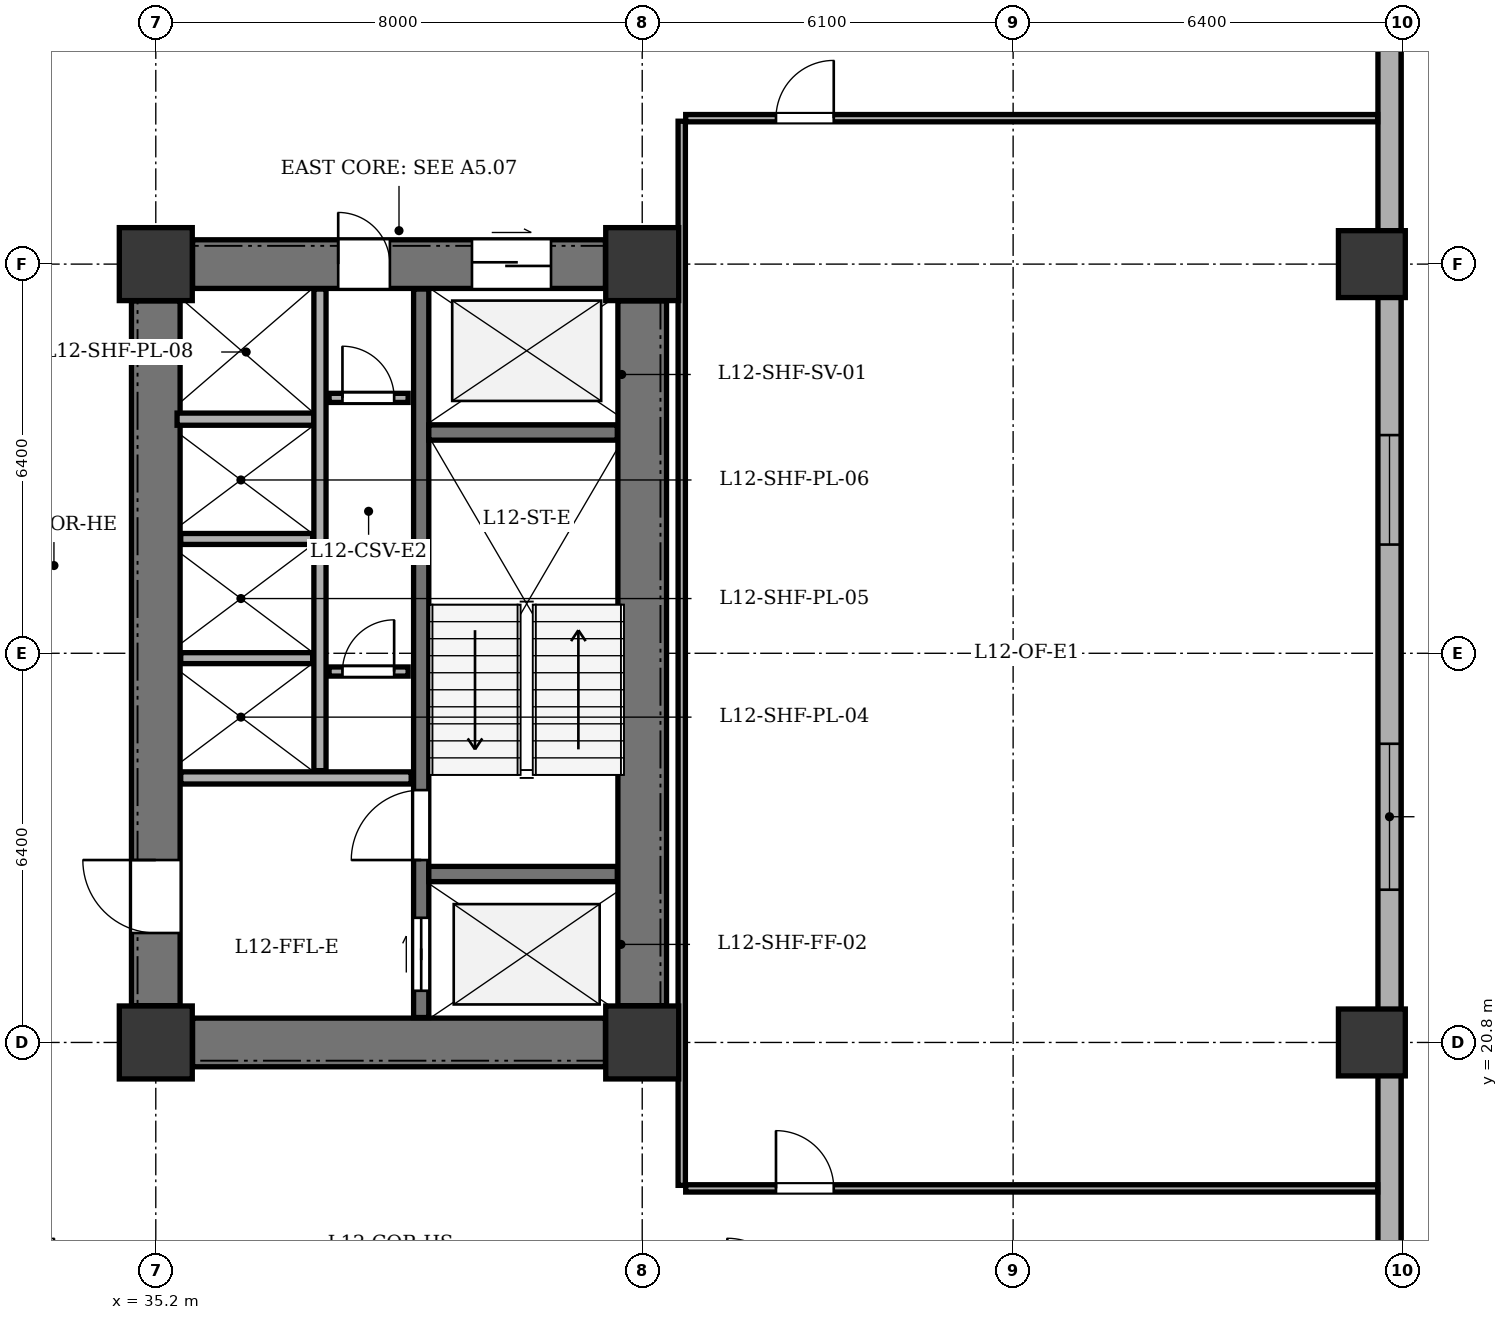
"""IFC4 building model, lengths in metres.
Left out: names, types, materials, properties, quantities, classifications, styles, units other than length and angle.
Written with IfcOpenShell. Run it as: python <this file> out.ifc"""

import sys

from ifc_helpers import new_model, si_unit, direction, frame, frame_2d, origin, origin_2d, place, context, subcontext, project, spatial, rectangle, extrude, element, fill, save


model = new_model("IFC4")
c1 = context("Model", 3, precision=1e-05, world=origin(), true_north=direction((0.0, 1.0)))
c2 = subcontext(c1, "Body", "Model", "MODEL_VIEW")
j1 = project(units=[si_unit("LENGTHUNIT", "METRE"), si_unit("PLANEANGLEUNIT", "RADIAN")], contexts=[c1])
p1 = place(None, origin())
s1 = spatial("IfcSite", under=j1, at=p1, CompositionType="ELEMENT")
p2 = place(p1, origin())
s2 = spatial("IfcBuilding", under=s1, at=p2, CompositionType="ELEMENT")
p3 = place(p2, frame((0.0, 0.0, 51.6)))
s3 = spatial("IfcBuildingStorey", under=s2, at=p3, CompositionType="ELEMENT", Elevation=51.6)
for number, where, z_axis, x_axis in (
    (1, (35.2, 20.8, 0.0), (0.0, 0.0, 1.0), (1.0, 0.0, 0.0)),
    (2, (43.2, 20.8, 0.0), (0.0, 0.0, 1.0), (1.0, 0.0, 0.0)),
    (3, (35.2, 33.6, 0.0), (0.0, 0.0, 1.0), (1.0, 0.0, 0.0)),
    (4, (43.2, 33.6, 0.0), (0.0, 0.0, 1.0), (1.0, 0.0, 0.0)),
):
    element("IfcColumn", number, at=place(p3, frame(where, z_axis=z_axis, x_axis=x_axis)), inside=s3, PredefinedType="COLUMN", context=c2, shape_type="SweptSolid", body=[
        extrude(rectangle(XDim=1.2, YDim=1.2, at=origin_2d()), origin(), (0.0, 0.0, 1.0), 3.9),
    ])
for number, where, z_axis, x_axis in (
    (5, (55.2, 20.8, 0.0), (0.0, 0.0, 1.0), (1.0, 0.0, 0.0)),
    (6, (55.2, 33.6, 0.0), (0.0, 0.0, 1.0), (1.0, 0.0, 0.0)),
):
    element("IfcColumn", number, at=place(p3, frame(where, z_axis=z_axis, x_axis=x_axis)), inside=s3, PredefinedType="COLUMN", context=c2, shape_type="SweptSolid", body=[
        extrude(rectangle(XDim=1.1, YDim=1.1, at=origin_2d()), origin(), (0.0, 0.0, 1.0), 3.9),
    ])
p4 = place(p3, frame((55.49, 41.5, 0.0), z_axis=(0.0, 0.0, 1.0), x_axis=(0.0, -1.0, 0.0)))
e7 = element("IfcWall", 7, at=p4, inside=s3, PredefinedType="STANDARD", context=c2, shape_type="SweptSolid", body=[
    extrude(rectangle(XDim=35.0, YDim=0.38, at=frame_2d((17.5, 0.0))), origin(), (0.0, 0.0, 1.0), 3.135),
])
p5 = place(p4, frame((2.025, 0.0, 0.8)))
e8 = element("IfcOpeningElement", 8, at=p5, cuts=e7, PredefinedType="OPENING", context=c2, shape_type="SweptSolid", body=[
    extrude(rectangle(XDim=1.8, YDim=1.9, at=frame_2d((0.9, 0.95))), frame((0.0, 0.2, 0.0), z_axis=(0.0, -1.0, 0.0), x_axis=(1.0, 0.0, 0.0)), (0.0, 0.0, 1.0), 0.4),
])
p6 = place(p4, frame((10.712, 0.0, 0.8)))
e9 = element("IfcOpeningElement", 9, at=p6, cuts=e7, PredefinedType="OPENING", context=c2, shape_type="SweptSolid", body=[
    extrude(rectangle(XDim=1.8, YDim=1.9, at=frame_2d((0.9, 0.95))), frame((0.0, 0.2, 0.0), z_axis=(0.0, -1.0, 0.0), x_axis=(1.0, 0.0, 0.0)), (0.0, 0.0, 1.0), 0.4),
])
p7 = place(p4, frame((15.788, 0.0, 0.8)))
e10 = element("IfcOpeningElement", 10, at=p7, cuts=e7, PredefinedType="OPENING", context=c2, shape_type="SweptSolid", body=[
    extrude(rectangle(XDim=2.4, YDim=1.9, at=frame_2d((1.2, 0.95))), frame((0.0, 0.2, 0.0), z_axis=(0.0, -1.0, 0.0), x_axis=(1.0, 0.0, 0.0)), (0.0, 0.0, 1.0), 0.4),
])
p8 = place(p4, frame((25.443, 0.0, 0.8)))
e11 = element("IfcOpeningElement", 11, at=p8, cuts=e7, PredefinedType="OPENING", context=c2, shape_type="SweptSolid", body=[
    extrude(rectangle(XDim=1.8, YDim=1.9, at=frame_2d((0.9, 0.95))), frame((0.0, 0.2, 0.0), z_axis=(0.0, -1.0, 0.0), x_axis=(1.0, 0.0, 0.0)), (0.0, 0.0, 1.0), 0.4),
])
p9 = place(p4, frame((30.207, 0.0, 0.8)))
e12 = element("IfcOpeningElement", 12, at=p9, cuts=e7, PredefinedType="OPENING", context=c2, shape_type="SweptSolid", body=[
    extrude(rectangle(XDim=2.4, YDim=1.9, at=frame_2d((1.2, 0.95))), frame((0.0, 0.2, 0.0), z_axis=(0.0, -1.0, 0.0), x_axis=(1.0, 0.0, 0.0)), (0.0, 0.0, 1.0), 0.4),
])
p10 = place(p3, frame((43.2, 21.405, 0.0), z_axis=(0.0, 0.0, 1.0), x_axis=(0.0, 1.0, 0.0)))
e13 = element("IfcWall", 13, at=p10, inside=s3, PredefinedType="SHEAR", context=c2, shape_type="SweptSolid", body=[
    extrude(rectangle(XDim=11.59, YDim=0.8, at=frame_2d((5.795, 0.0))), origin(), (0.0, 0.0, 1.0), 3.6),
])
p11 = place(p3, frame((35.805, 20.8, 0.0), z_axis=(0.0, 0.0, 1.0), x_axis=(1.0, 0.0, 0.0)))
e14 = element("IfcWall", 14, at=p11, inside=s3, PredefinedType="SHEAR", context=c2, shape_type="SweptSolid", body=[
    extrude(rectangle(XDim=6.79, YDim=0.8, at=frame_2d((3.395, 0.0))), origin(), (0.0, 0.0, 1.0), 3.6),
])
p12 = place(p3, frame((35.805, 33.6, 0.0), z_axis=(0.0, 0.0, 1.0), x_axis=(1.0, 0.0, 0.0)))
e15 = element("IfcWall", 15, at=p12, inside=s3, PredefinedType="SHEAR", context=c2, shape_type="SweptSolid", body=[
    extrude(rectangle(XDim=6.79, YDim=0.8, at=frame_2d((3.395, 0.0))), origin(), (0.0, 0.0, 1.0), 3.6),
])
p13 = place(p12, frame((4.595, 0.0, 0.0)))
e16 = element("IfcOpeningElement", 16, at=p13, cuts=e15, PredefinedType="OPENING", context=c2, shape_type="SweptSolid", body=[
    extrude(rectangle(XDim=1.3, YDim=2.15, at=frame_2d((0.65, 1.075))), frame((0.0, 0.41, 0.0), z_axis=(0.0, -1.0, 0.0), x_axis=(1.0, 0.0, 0.0)), (0.0, 0.0, 1.0), 0.82),
])
p14 = place(p12, frame((2.395, 0.0, 0.0)))
e17 = element("IfcOpeningElement", 17, at=p14, cuts=e15, PredefinedType="OPENING", context=c2, shape_type="SweptSolid", body=[
    extrude(rectangle(XDim=0.85, YDim=2.02, at=frame_2d((0.425, 1.01))), frame((0.0, 0.41, 0.0), z_axis=(0.0, -1.0, 0.0), x_axis=(1.0, 0.0, 0.0)), (0.0, 0.0, 1.0), 0.82),
])
p15 = place(p3, frame((35.2, 21.405, 0.0), z_axis=(0.0, 0.0, 1.0), x_axis=(0.0, 1.0, 0.0)))
e18 = element("IfcWall", 18, at=p15, inside=s3, PredefinedType="SHEAR", context=c2, shape_type="SweptSolid", body=[
    extrude(rectangle(XDim=11.59, YDim=0.8, at=frame_2d((5.795, 0.0))), origin(), (0.0, 0.0, 1.0), 3.6),
])
p16 = place(p15, frame((1.195, 0.0, 0.0)))
e19 = element("IfcOpeningElement", 19, at=p16, cuts=e18, PredefinedType="OPENING", context=c2, shape_type="SweptSolid", body=[
    extrude(rectangle(XDim=1.2, YDim=2.15, at=frame_2d((0.6, 1.075))), frame((0.0, 0.41, 0.0), z_axis=(0.0, -1.0, 0.0), x_axis=(1.0, 0.0, 0.0)), (0.0, 0.0, 1.0), 0.82),
])
p17 = place(p3, frame((39.565, 21.21, 0.0), z_axis=(0.0, 0.0, 1.0), x_axis=(0.0, 1.0, 0.0)))
e20 = element("IfcWall", 20, at=p17, inside=s3, PredefinedType="SHEAR", context=c2, shape_type="SweptSolid", body=[
    extrude(rectangle(XDim=11.98, YDim=0.25, at=frame_2d((5.99, 0.0))), origin(), (0.0, 0.0, 1.0), 3.6),
])
p18 = place(p17, frame((0.44, 0.0, 0.0)))
e21 = element("IfcOpeningElement", 21, at=p18, cuts=e20, PredefinedType="OPENING", context=c2, shape_type="SweptSolid", body=[
    extrude(rectangle(XDim=1.2, YDim=2.15, at=frame_2d((0.6, 1.075))), frame((0.0, 0.135, 0.0), z_axis=(0.0, -1.0, 0.0), x_axis=(1.0, 0.0, 0.0)), (0.0, 0.0, 1.0), 0.27),
])
p19 = place(p17, frame((2.59, 0.0, 0.0)))
e22 = element("IfcOpeningElement", 22, at=p19, cuts=e20, PredefinedType="OPENING", context=c2, shape_type="SweptSolid", body=[
    extrude(rectangle(XDim=1.15, YDim=2.15, at=frame_2d((0.575, 1.075))), frame((0.0, 0.135, 0.0), z_axis=(0.0, -1.0, 0.0), x_axis=(1.0, 0.0, 0.0)), (0.0, 0.0, 1.0), 0.27),
])
for number, where, z_axis, x_axis in (
    (23, (39.69, 23.57, 0.0), (0.0, 0.0, 1.0), (1.0, 0.0, 0.0)),
    (24, (39.69, 30.83, 0.0), (0.0, 0.0, 1.0), (1.0, 0.0, 0.0)),
):
    element("IfcWall", number, at=place(p3, frame(where, z_axis=z_axis, x_axis=x_axis)), inside=s3, PredefinedType="SHEAR", context=c2, shape_type="SweptSolid", body=[
        extrude(rectangle(XDim=3.1, YDim=0.25, at=frame_2d((1.55, 0.0))), origin(), (0.0, 0.0, 1.0), 3.6),
    ])
p20 = place(p3, frame((35.61, 25.15, 0.0), z_axis=(0.0, 0.0, 1.0), x_axis=(1.0, 0.0, 0.0)))
e25 = element("IfcWall", 25, at=p20, inside=s3, PredefinedType="SOLIDWALL", context=c2, shape_type="SweptSolid", body=[
    extrude(rectangle(XDim=3.79, YDim=0.2, at=frame_2d((1.895, 0.0))), origin(), (0.0, 0.0, 1.0), 3.6),
])
p21 = place(p3, frame((35.55, 31.05, 0.0), z_axis=(0.0, 0.0, 1.0), x_axis=(1.0, 0.0, 0.0)))
e26 = element("IfcWall", 26, at=p21, inside=s3, PredefinedType="SOLIDWALL", context=c2, shape_type="SweptSolid", body=[
    extrude(rectangle(XDim=2.25, YDim=0.2, at=frame_2d((1.125, 0.0))), origin(), (0.0, 0.0, 1.0), 3.6),
])
p22 = place(p3, frame((37.9, 25.27, 0.0), z_axis=(0.0, 0.0, 1.0), x_axis=(0.0, 1.0, 0.0)))
e27 = element("IfcWall", 27, at=p22, inside=s3, PredefinedType="SOLIDWALL", context=c2, shape_type="SweptSolid", body=[
    extrude(rectangle(XDim=7.92, YDim=0.2, at=frame_2d((3.96, 0.0))), origin(), (0.0, 0.0, 1.0), 3.6),
])
for number, where, z_axis, x_axis in (
    (28, (35.61, 27.12, 0.0), (0.0, 0.0, 1.0), (1.0, 0.0, 0.0)),
    (29, (35.61, 29.08, 0.0), (0.0, 0.0, 1.0), (1.0, 0.0, 0.0)),
):
    element("IfcWall", number, at=place(p3, frame(where, z_axis=z_axis, x_axis=x_axis)), inside=s3, PredefinedType="PARTITIONING", context=c2, shape_type="SweptSolid", body=[
        extrude(rectangle(XDim=2.17, YDim=0.18, at=frame_2d((1.085, 0.0))), origin(), (0.0, 0.0, 1.0), 3.6),
    ])
p23 = place(p3, frame((38.05, 26.9, 0.0), z_axis=(0.0, 0.0, 1.0), x_axis=(1.0, 0.0, 0.0)))
e30 = element("IfcWall", 30, at=p23, inside=s3, PredefinedType="PARTITIONING", context=c2, shape_type="SweptSolid", body=[
    extrude(rectangle(XDim=1.3, YDim=0.15, at=frame_2d((0.65, 0.0))), origin(), (0.0, 0.0, 1.0), 3.6),
])
p24 = place(p23, frame((0.22, 0.0, 0.0)))
e31 = element("IfcOpeningElement", 31, at=p24, cuts=e30, PredefinedType="OPENING", context=c2, shape_type="SweptSolid", body=[
    extrude(rectangle(XDim=0.85, YDim=2.02, at=frame_2d((0.425, 1.01))), frame((0.0, 0.085, 0.0), z_axis=(0.0, -1.0, 0.0), x_axis=(1.0, 0.0, 0.0)), (0.0, 0.0, 1.0), 0.17),
])
p25 = place(p3, frame((38.05, 31.4, 0.0), z_axis=(0.0, 0.0, 1.0), x_axis=(1.0, 0.0, 0.0)))
e32 = element("IfcWall", 32, at=p25, inside=s3, PredefinedType="PARTITIONING", context=c2, shape_type="SweptSolid", body=[
    extrude(rectangle(XDim=1.3, YDim=0.15, at=frame_2d((0.65, 0.0))), origin(), (0.0, 0.0, 1.0), 3.6),
])
p26 = place(p25, frame((0.22, 0.0, 0.0)))
e33 = element("IfcOpeningElement", 33, at=p26, cuts=e32, PredefinedType="OPENING", context=c2, shape_type="SweptSolid", body=[
    extrude(rectangle(XDim=0.85, YDim=2.02, at=frame_2d((0.425, 1.01))), frame((0.0, 0.085, 0.0), z_axis=(0.0, -1.0, 0.0), x_axis=(1.0, 0.0, 0.0)), (0.0, 0.0, 1.0), 0.17),
])
p27 = place(p3, frame((43.85, 18.45, 0.0), z_axis=(0.0, 0.0, 1.0), x_axis=(0.0, 1.0, 0.0)))
e34 = element("IfcWall", 34, at=p27, inside=s3, PredefinedType="PARTITIONING", context=c2, shape_type="SweptSolid", body=[
    extrude(rectangle(XDim=17.5, YDim=0.12, at=frame_2d((8.75, 0.0))), origin(), (0.0, 0.0, 1.0), 3.6),
])
p28 = place(p3, frame((43.915, 18.4, 0.0), z_axis=(0.0, 0.0, 1.0), x_axis=(1.0, 0.0, 0.0)))
e35 = element("IfcWall", 35, at=p28, inside=s3, PredefinedType="PARTITIONING", context=c2, shape_type="SweptSolid", body=[
    extrude(rectangle(XDim=11.38, YDim=0.12, at=frame_2d((5.69, 0.0))), origin(), (0.0, 0.0, 1.0), 3.6),
])
p29 = place(p28, frame((1.485, 0.0, 0.0)))
e36 = element("IfcOpeningElement", 36, at=p29, cuts=e35, PredefinedType="OPENING", context=c2, shape_type="SweptSolid", body=[
    extrude(rectangle(XDim=0.95, YDim=2.1, at=frame_2d((0.475, 1.05))), frame((0.0, 0.07, 0.0), z_axis=(0.0, -1.0, 0.0), x_axis=(1.0, 0.0, 0.0)), (0.0, 0.0, 1.0), 0.14),
])
p30 = place(p3, frame((43.915, 36.0, 0.0), z_axis=(0.0, 0.0, 1.0), x_axis=(1.0, 0.0, 0.0)))
e37 = element("IfcWall", 37, at=p30, inside=s3, PredefinedType="PARTITIONING", context=c2, shape_type="SweptSolid", body=[
    extrude(rectangle(XDim=11.38, YDim=0.12, at=frame_2d((5.69, 0.0))), origin(), (0.0, 0.0, 1.0), 3.6),
])
p31 = place(p30, frame((1.485, 0.0, 0.0)))
e38 = element("IfcOpeningElement", 38, at=p31, cuts=e37, PredefinedType="OPENING", context=c2, shape_type="SweptSolid", body=[
    extrude(rectangle(XDim=0.95, YDim=2.1, at=frame_2d((0.475, 1.05))), frame((0.0, 0.07, 0.0), z_axis=(0.0, -1.0, 0.0), x_axis=(1.0, 0.0, 0.0)), (0.0, 0.0, 1.0), 0.14),
])
p32 = place(p6, origin())
e39 = element("IfcWindow", 39, at=p32, inside=s3, PartitioningType="SINGLE_PANEL", PredefinedType="WINDOW", context=c2, shape_type="SweptSolid", body=[
    extrude(rectangle(XDim=1.8, YDim=1.9, at=frame_2d((0.9, 0.95))), frame((0.0, -0.01, 0.0), z_axis=(0.0, -1.0, 0.0), x_axis=(1.0, 0.0, 0.0)), (0.0, 0.0, 1.0), 0.06),
])
fill(e9, e39)
p33 = place(p7, origin())
e40 = element("IfcWindow", 40, at=p33, inside=s3, PartitioningType="SINGLE_PANEL", PredefinedType="WINDOW", context=c2, shape_type="SweptSolid", body=[
    extrude(rectangle(XDim=2.4, YDim=1.9, at=frame_2d((1.2, 0.95))), frame((0.0, -0.01, 0.0), z_axis=(0.0, -1.0, 0.0), x_axis=(1.0, 0.0, 0.0)), (0.0, 0.0, 1.0), 0.06),
])
fill(e10, e40)
p34 = place(p13, origin())
e41 = element("IfcDoor", 41, at=p34, inside=s3, OperationType="DOUBLE_DOOR_SLIDING", PredefinedType="DOOR", context=c2, shape_type="SweptSolid", body=[
    extrude(rectangle(XDim=1.3, YDim=2.15, at=frame_2d((0.65, 1.075))), frame((0.0, 0.025, 0.0), z_axis=(0.0, -1.0, 0.0), x_axis=(1.0, 0.0, 0.0)), (0.0, 0.0, 1.0), 0.05),
])
fill(e16, e41)
p35 = place(p14, origin())
e42 = element("IfcDoor", 42, at=p35, inside=s3, OperationType="SINGLE_SWING_LEFT", PredefinedType="DOOR", context=c2, shape_type="SweptSolid", body=[
    extrude(rectangle(XDim=0.85, YDim=2.02, at=frame_2d((0.425, 1.01))), frame((0.0, 0.025, 0.0), z_axis=(0.0, -1.0, 0.0), x_axis=(1.0, 0.0, 0.0)), (0.0, 0.0, 1.0), 0.05),
])
fill(e17, e42)
p36 = place(p16, origin())
e43 = element("IfcDoor", 43, at=p36, inside=s3, OperationType="SINGLE_SWING_RIGHT", PredefinedType="DOOR", context=c2, shape_type="SweptSolid", body=[
    extrude(rectangle(XDim=1.2, YDim=2.15, at=frame_2d((0.6, 1.075))), frame((0.0, 0.025, 0.0), z_axis=(0.0, -1.0, 0.0), x_axis=(1.0, 0.0, 0.0)), (0.0, 0.0, 1.0), 0.05),
])
fill(e19, e43)
p37 = place(p18, origin())
e44 = element("IfcDoor", 44, at=p37, inside=s3, OperationType="DOUBLE_DOOR_SLIDING", PredefinedType="DOOR", context=c2, shape_type="SweptSolid", body=[
    extrude(rectangle(XDim=1.2, YDim=2.15, at=frame_2d((0.6, 1.075))), frame((0.0, 0.025, 0.0), z_axis=(0.0, -1.0, 0.0), x_axis=(1.0, 0.0, 0.0)), (0.0, 0.0, 1.0), 0.05),
])
fill(e21, e44)
p38 = place(p19, origin())
e45 = element("IfcDoor", 45, at=p38, inside=s3, OperationType="SINGLE_SWING_LEFT", PredefinedType="DOOR", context=c2, shape_type="SweptSolid", body=[
    extrude(rectangle(XDim=1.15, YDim=2.15, at=frame_2d((0.575, 1.075))), frame((0.0, 0.025, 0.0), z_axis=(0.0, -1.0, 0.0), x_axis=(1.0, 0.0, 0.0)), (0.0, 0.0, 1.0), 0.05),
])
fill(e22, e45)
p39 = place(p24, origin())
e46 = element("IfcDoor", 46, at=p39, inside=s3, OperationType="SINGLE_SWING_RIGHT", PredefinedType="DOOR", context=c2, shape_type="SweptSolid", body=[
    extrude(rectangle(XDim=0.85, YDim=2.02, at=frame_2d((0.425, 1.01))), frame((0.0, 0.025, 0.0), z_axis=(0.0, -1.0, 0.0), x_axis=(1.0, 0.0, 0.0)), (0.0, 0.0, 1.0), 0.05),
])
fill(e31, e46)
p40 = place(p26, origin())
e47 = element("IfcDoor", 47, at=p40, inside=s3, OperationType="SINGLE_SWING_LEFT", PredefinedType="DOOR", context=c2, shape_type="SweptSolid", body=[
    extrude(rectangle(XDim=0.85, YDim=2.02, at=frame_2d((0.425, 1.01))), frame((0.0, 0.025, 0.0), z_axis=(0.0, -1.0, 0.0), x_axis=(1.0, 0.0, 0.0)), (0.0, 0.0, 1.0), 0.05),
])
fill(e33, e47)
p41 = place(p29, origin())
e48 = element("IfcDoor", 48, at=p41, inside=s3, OperationType="SINGLE_SWING_LEFT", PredefinedType="DOOR", context=c2, shape_type="SweptSolid", body=[
    extrude(rectangle(XDim=0.95, YDim=2.1, at=frame_2d((0.475, 1.05))), frame((0.0, 0.025, 0.0), z_axis=(0.0, -1.0, 0.0), x_axis=(1.0, 0.0, 0.0)), (0.0, 0.0, 1.0), 0.05),
])
fill(e36, e48)
p42 = place(p31, origin())
e49 = element("IfcDoor", 49, at=p42, inside=s3, OperationType="SINGLE_SWING_RIGHT", PredefinedType="DOOR", context=c2, shape_type="SweptSolid", body=[
    extrude(rectangle(XDim=0.95, YDim=2.1, at=frame_2d((0.475, 1.05))), frame((0.0, 0.025, 0.0), z_axis=(0.0, -1.0, 0.0), x_axis=(1.0, 0.0, 0.0)), (0.0, 0.0, 1.0), 0.05),
])
fill(e38, e49)
save(model, sys.argv[1])
